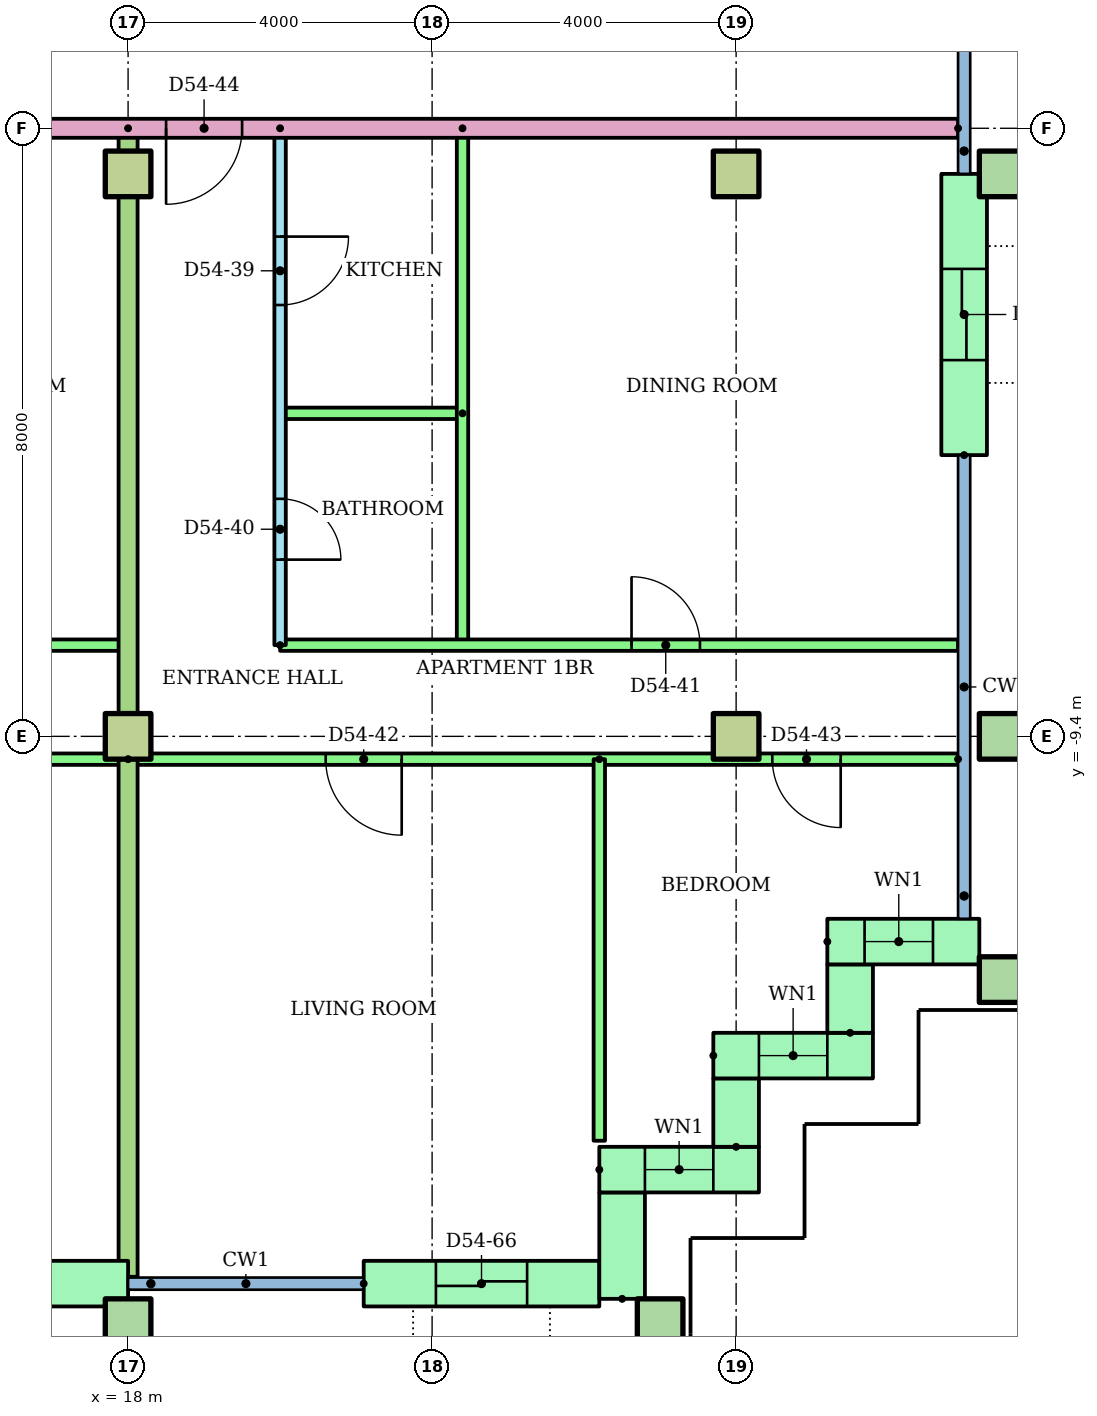
"""IFC4 building model, lengths in metres.
Left out: names, types, materials, properties, quantities, classifications, styles, units other than length and angle.
Written with IfcOpenShell. Run it as: python <this file> out.ifc"""

import sys

from ifc_helpers import new_model, si_unit, direction, frame, frame_2d, origin, origin_2d, place, context, subcontext, project, spatial, rectangle, hollow_rectangle, extrude, element, fill, save


model = new_model("IFC4")
c1 = context("Model", 3, precision=1e-05, world=origin(), true_north=direction((0.0, 1.0)))
c2 = subcontext(c1, "Body", "Model", "MODEL_VIEW")
j1 = project(units=[si_unit("LENGTHUNIT", "METRE"), si_unit("PLANEANGLEUNIT", "RADIAN")], contexts=[c1])
p1 = place(None, origin())
s1 = spatial("IfcSite", under=j1, at=p1, CompositionType="ELEMENT")
p2 = place(p1, origin())
s2 = spatial("IfcBuilding", under=s1, at=p2, CompositionType="ELEMENT")
p3 = place(p2, frame((0.0, 0.0, 210.8)))
s3 = spatial("IfcBuildingStorey", under=s2, at=p3, CompositionType="ELEMENT", Elevation=210.8)
for number, where in (
    (1, (18.0, -17.1, 0.0)),
    (2, (25.0, -17.1, 0.0)),
    (3, (29.5, -12.6, 0.0)),
):
    element("IfcColumn", number, at=place(p3, frame(where)), inside=s3, PredefinedType="COLUMN", context=c2, shape_type="SweptSolid", body=[
        extrude(hollow_rectangle(XDim=0.6, YDim=0.6, WallThickness=0.03, at=origin_2d()), origin(), (0.0, 0.0, 1.0), 3.2),
    ])
for number, where in (
    (4, (18.0, -9.4, 0.0)),
    (5, (26.0, -9.4, 0.0)),
):
    element("IfcColumn", number, at=place(p3, frame(where)), inside=s3, PredefinedType="COLUMN", context=c2, shape_type="SweptSolid", body=[
        extrude(rectangle(XDim=0.6, YDim=0.6, at=origin_2d()), origin(), (0.0, 0.0, 1.0), 3.2),
    ])
p4 = place(p3, frame((29.5, -9.4, 0.0)))
e6 = element("IfcColumn", 6, at=p4, inside=s3, PredefinedType="COLUMN", context=c2, shape_type="SweptSolid", body=[
    extrude(hollow_rectangle(XDim=0.6, YDim=0.6, WallThickness=0.03, at=origin_2d()), origin(), (0.0, 0.0, 1.0), 3.2),
])
for number, where in (
    (7, (18.0, -2.0, 0.0)),
    (8, (26.0, -2.0, 0.0)),
):
    element("IfcColumn", number, at=place(p3, frame(where)), inside=s3, PredefinedType="COLUMN", context=c2, shape_type="SweptSolid", body=[
        extrude(rectangle(XDim=0.6, YDim=0.6, at=origin_2d()), origin(), (0.0, 0.0, 1.0), 3.2),
    ])
p5 = place(p3, frame((29.5, -2.0, 0.0)))
e9 = element("IfcColumn", 9, at=p5, inside=s3, PredefinedType="COLUMN", context=c2, shape_type="SweptSolid", body=[
    extrude(hollow_rectangle(XDim=0.6, YDim=0.6, WallThickness=0.03, at=origin_2d()), origin(), (0.0, 0.0, 1.0), 3.2),
])
p6 = place(p3, frame((14.0, -16.6, 0.0)))
e10 = element("IfcWall", 10, at=p6, inside=s3, PredefinedType="STANDARD", context=c2, shape_type="SweptSolid", body=[
    extrude(rectangle(XDim=4.0, YDim=0.6, at=frame_2d((2.0, 0.0))), origin(), (0.0, 0.0, 1.0), 2.92),
])
p7 = place(p6, frame((1.4, 0.0, 0.0)))
e11 = element("IfcOpeningElement", 11, at=p7, cuts=e10, PredefinedType="OPENING", context=c2, shape_type="SweptSolid", body=[
    extrude(rectangle(XDim=1.2, YDim=2.1, at=frame_2d((0.6, 1.05))), frame((0.0, 0.31, 0.0), z_axis=(0.0, -1.0, 0.0), x_axis=(1.0, 0.0, 0.0)), (0.0, 0.0, 1.0), 0.62),
])
p8 = place(p3, frame((21.1, -16.6, 0.0)))
e12 = element("IfcWall", 12, at=p8, inside=s3, PredefinedType="STANDARD", context=c2, shape_type="SweptSolid", body=[
    extrude(rectangle(XDim=3.1, YDim=0.6, at=frame_2d((1.55, 0.0))), origin(), (0.0, 0.0, 1.0), 2.92),
])
p9 = place(p8, frame((0.95, 0.0, 0.0)))
e13 = element("IfcOpeningElement", 13, at=p9, cuts=e12, PredefinedType="OPENING", context=c2, shape_type="SweptSolid", body=[
    extrude(rectangle(XDim=1.2, YDim=2.1, at=frame_2d((0.6, 1.05))), frame((0.0, 0.31, 0.0), z_axis=(0.0, -1.0, 0.0), x_axis=(1.0, 0.0, 0.0)), (0.0, 0.0, 1.0), 0.62),
])
p10 = place(p3, frame((24.5, -16.8, 0.0), z_axis=(0.0, 0.0, 1.0), x_axis=(0.0, 1.0, 0.0)))
e14 = element("IfcWall", 14, at=p10, inside=s3, PredefinedType="STANDARD", context=c2, shape_type="SweptSolid", body=[
    extrude(rectangle(XDim=1.4, YDim=0.6, at=frame_2d((0.7, 0.0))), origin(), (0.0, 0.0, 1.0), 2.92),
])
p11 = place(p3, frame((24.2, -15.1, 0.0)))
e15 = element("IfcWall", 15, at=p11, inside=s3, PredefinedType="STANDARD", context=c2, shape_type="SweptSolid", body=[
    extrude(rectangle(XDim=2.1, YDim=0.6, at=frame_2d((1.05, 0.0))), origin(), (0.0, 0.0, 1.0), 2.92),
])
p12 = place(p11, frame((0.6, 0.0, 0.9)))
e16 = element("IfcOpeningElement", 16, at=p12, cuts=e15, PredefinedType="OPENING", context=c2, shape_type="SweptSolid", body=[
    extrude(rectangle(XDim=0.9, YDim=1.5, at=frame_2d((0.45, 0.75))), frame((0.0, 0.31, 0.0), z_axis=(0.0, -1.0, 0.0), x_axis=(1.0, 0.0, 0.0)), (0.0, 0.0, 1.0), 0.62),
])
p13 = place(p3, frame((26.0, -14.8, 0.0), z_axis=(0.0, 0.0, 1.0), x_axis=(0.0, 1.0, 0.0)))
e17 = element("IfcWall", 17, at=p13, inside=s3, PredefinedType="STANDARD", context=c2, shape_type="SweptSolid", body=[
    extrude(rectangle(XDim=0.9, YDim=0.6, at=frame_2d((0.45, 0.0))), origin(), (0.0, 0.0, 1.0), 2.92),
])
p14 = place(p3, frame((25.7, -13.6, 0.0)))
e18 = element("IfcWall", 18, at=p14, inside=s3, PredefinedType="STANDARD", context=c2, shape_type="SweptSolid", body=[
    extrude(rectangle(XDim=2.1, YDim=0.6, at=frame_2d((1.05, 0.0))), origin(), (0.0, 0.0, 1.0), 2.92),
])
p15 = place(p14, frame((0.6, 0.0, 0.9)))
e19 = element("IfcOpeningElement", 19, at=p15, cuts=e18, PredefinedType="OPENING", context=c2, shape_type="SweptSolid", body=[
    extrude(rectangle(XDim=0.9, YDim=1.5, at=frame_2d((0.45, 0.75))), frame((0.0, 0.31, 0.0), z_axis=(0.0, -1.0, 0.0), x_axis=(1.0, 0.0, 0.0)), (0.0, 0.0, 1.0), 0.62),
])
p16 = place(p3, frame((27.5, -13.3, 0.0), z_axis=(0.0, 0.0, 1.0), x_axis=(0.0, 1.0, 0.0)))
e20 = element("IfcWall", 20, at=p16, inside=s3, PredefinedType="STANDARD", context=c2, shape_type="SweptSolid", body=[
    extrude(rectangle(XDim=0.9, YDim=0.6, at=frame_2d((0.45, 0.0))), origin(), (0.0, 0.0, 1.0), 2.92),
])
p17 = place(p3, frame((27.2, -12.1, 0.0)))
e21 = element("IfcWall", 21, at=p17, inside=s3, PredefinedType="STANDARD", context=c2, shape_type="SweptSolid", body=[
    extrude(rectangle(XDim=2.0, YDim=0.6, at=frame_2d((1.0, 0.0))), origin(), (0.0, 0.0, 1.0), 2.92),
])
p18 = place(p17, frame((0.49, 0.0, 0.9)))
e22 = element("IfcOpeningElement", 22, at=p18, cuts=e21, PredefinedType="OPENING", context=c2, shape_type="SweptSolid", body=[
    extrude(rectangle(XDim=0.9, YDim=1.5, at=frame_2d((0.45, 0.75))), frame((0.0, 0.31, 0.0), z_axis=(0.0, -1.0, 0.0), x_axis=(1.0, 0.0, 0.0)), (0.0, 0.0, 1.0), 0.62),
])
p19 = place(p3, frame((29.0, -5.7, 0.0), z_axis=(0.0, 0.0, 1.0), x_axis=(0.0, 1.0, 0.0)))
e23 = element("IfcWall", 23, at=p19, inside=s3, PredefinedType="STANDARD", context=c2, shape_type="SweptSolid", body=[
    extrude(rectangle(XDim=3.7, YDim=0.6, at=frame_2d((1.85, 0.0))), origin(), (0.0, 0.0, 1.0), 2.92),
])
p20 = place(p19, frame((1.25, 0.0, 0.0)))
e24 = element("IfcOpeningElement", 24, at=p20, cuts=e23, PredefinedType="OPENING", context=c2, shape_type="SweptSolid", body=[
    extrude(rectangle(XDim=1.2, YDim=2.1, at=frame_2d((0.6, 1.05))), frame((0.0, 0.31, 0.0), z_axis=(0.0, -1.0, 0.0), x_axis=(1.0, 0.0, 0.0)), (0.0, 0.0, 1.0), 0.62),
])
p21 = place(p3, frame((12.0, -8.2, 0.0)))
e25 = element("IfcWall", 25, at=p21, inside=s3, PredefinedType="PARTITIONING", context=c2, shape_type="SweptSolid", body=[
    extrude(rectangle(XDim=6.0, YDim=0.15, at=frame_2d((3.0, 0.0))), origin(), (0.0, 0.0, 1.0), 2.4),
])
p22 = place(p21, frame((3.75, 0.0, 0.0)))
e26 = element("IfcOpeningElement", 26, at=p22, cuts=e25, PredefinedType="OPENING", context=c2, shape_type="SweptSolid", body=[
    extrude(rectangle(XDim=0.9, YDim=2.1, at=frame_2d((0.45, 1.05))), frame((0.0, 0.085, 0.0), z_axis=(0.0, -1.0, 0.0), x_axis=(1.0, 0.0, 0.0)), (0.0, 0.0, 1.0), 0.17),
])
p23 = place(p3, frame((18.0, -9.7, 0.0), z_axis=(0.0, 0.0, 1.0), x_axis=(-1.0, 0.0, 0.0)))
e27 = element("IfcWall", 27, at=p23, inside=s3, PredefinedType="PARTITIONING", context=c2, shape_type="SweptSolid", body=[
    extrude(rectangle(XDim=8.0, YDim=0.15, at=frame_2d((4.0, 0.0))), origin(), (0.0, 0.0, 1.0), 2.4),
])
p24 = place(p23, frame((5.55, 0.0, 0.0)))
e28 = element("IfcOpeningElement", 28, at=p24, cuts=e27, PredefinedType="OPENING", context=c2, shape_type="SweptSolid", body=[
    extrude(rectangle(XDim=0.9, YDim=2.1, at=frame_2d((0.45, 1.05))), frame((0.0, 0.085, 0.0), z_axis=(0.0, -1.0, 0.0), x_axis=(1.0, 0.0, 0.0)), (0.0, 0.0, 1.0), 0.17),
])
p25 = place(p23, frame((1.5, 0.0, 0.0)))
e29 = element("IfcOpeningElement", 29, at=p25, cuts=e27, PredefinedType="OPENING", context=c2, shape_type="SweptSolid", body=[
    extrude(rectangle(XDim=1.0, YDim=2.1, at=frame_2d((0.5, 1.05))), frame((0.0, 0.085, 0.0), z_axis=(0.0, -1.0, 0.0), x_axis=(1.0, 0.0, 0.0)), (0.0, 0.0, 1.0), 0.17),
])
p26 = place(p3, frame((20.0, -1.4, 0.0), z_axis=(0.0, 0.0, 1.0), x_axis=(0.0, -1.0, 0.0)))
e30 = element("IfcWall", 30, at=p26, inside=s3, PredefinedType="PARTITIONING", context=c2, shape_type="SweptSolid", body=[
    extrude(rectangle(XDim=6.8, YDim=0.15, at=frame_2d((3.4, 0.0))), origin(), (0.0, 0.0, 1.0), 2.4),
])
p27 = place(p26, frame((1.425, 0.0, 0.0)))
e31 = element("IfcOpeningElement", 31, at=p27, cuts=e30, PredefinedType="OPENING", context=c2, shape_type="SweptSolid", body=[
    extrude(rectangle(XDim=0.9, YDim=2.1, at=frame_2d((0.45, 1.05))), frame((0.0, 0.085, 0.0), z_axis=(0.0, -1.0, 0.0), x_axis=(1.0, 0.0, 0.0)), (0.0, 0.0, 1.0), 0.17),
])
p28 = place(p26, frame((4.875, 0.0, 0.0)))
e32 = element("IfcOpeningElement", 32, at=p28, cuts=e30, PredefinedType="OPENING", context=c2, shape_type="SweptSolid", body=[
    extrude(rectangle(XDim=0.8, YDim=2.1, at=frame_2d((0.4, 1.05))), frame((0.0, 0.085, 0.0), z_axis=(0.0, -1.0, 0.0), x_axis=(1.0, 0.0, 0.0)), (0.0, 0.0, 1.0), 0.17),
])
p29 = place(p3, frame((22.4, -5.15, 0.0), z_axis=(0.0, 0.0, 1.0), x_axis=(-1.0, 0.0, 0.0)))
e33 = element("IfcWall", 33, at=p29, inside=s3, PredefinedType="PARTITIONING", context=c2, shape_type="SweptSolid", body=[
    extrude(rectangle(XDim=2.4, YDim=0.15, at=frame_2d((1.2, 0.0))), origin(), (0.0, 0.0, 1.0), 2.4),
])
p30 = place(p3, frame((22.4, -1.4, 0.0), z_axis=(0.0, 0.0, 1.0), x_axis=(0.0, -1.0, 0.0)))
e34 = element("IfcWall", 34, at=p30, inside=s3, PredefinedType="PARTITIONING", context=c2, shape_type="SweptSolid", body=[
    extrude(rectangle(XDim=6.8, YDim=0.15, at=frame_2d((3.4, 0.0))), origin(), (0.0, 0.0, 1.0), 2.4),
])
p31 = place(p3, frame((20.0, -8.2, 0.0)))
e35 = element("IfcWall", 35, at=p31, inside=s3, PredefinedType="PARTITIONING", context=c2, shape_type="SweptSolid", body=[
    extrude(rectangle(XDim=8.92, YDim=0.15, at=frame_2d((4.46, 0.0))), origin(), (0.0, 0.0, 1.0), 2.4),
])
p32 = place(p31, frame((4.624, 0.0, 0.0)))
e36 = element("IfcOpeningElement", 36, at=p32, cuts=e35, PredefinedType="OPENING", context=c2, shape_type="SweptSolid", body=[
    extrude(rectangle(XDim=0.9, YDim=2.1, at=frame_2d((0.45, 1.05))), frame((0.0, 0.085, 0.0), z_axis=(0.0, -1.0, 0.0), x_axis=(1.0, 0.0, 0.0)), (0.0, 0.0, 1.0), 0.17),
])
p33 = place(p3, frame((28.92, -9.7, 0.0), z_axis=(0.0, 0.0, 1.0), x_axis=(-1.0, 0.0, 0.0)))
e37 = element("IfcWall", 37, at=p33, inside=s3, PredefinedType="PARTITIONING", context=c2, shape_type="SweptSolid", body=[
    extrude(rectangle(XDim=10.92, YDim=0.15, at=frame_2d((5.46, 0.0))), origin(), (0.0, 0.0, 1.0), 2.4),
])
p34 = place(p33, frame((7.32, 0.0, 0.0)))
e38 = element("IfcOpeningElement", 38, at=p34, cuts=e37, PredefinedType="OPENING", context=c2, shape_type="SweptSolid", body=[
    extrude(rectangle(XDim=1.0, YDim=2.1, at=frame_2d((0.5, 1.05))), frame((0.0, 0.085, 0.0), z_axis=(0.0, -1.0, 0.0), x_axis=(1.0, 0.0, 0.0)), (0.0, 0.0, 1.0), 0.17),
])
p35 = place(p33, frame((1.544, 0.0, 0.0)))
e39 = element("IfcOpeningElement", 39, at=p35, cuts=e37, PredefinedType="OPENING", context=c2, shape_type="SweptSolid", body=[
    extrude(rectangle(XDim=0.9, YDim=2.1, at=frame_2d((0.45, 1.05))), frame((0.0, 0.085, 0.0), z_axis=(0.0, -1.0, 0.0), x_axis=(1.0, 0.0, 0.0)), (0.0, 0.0, 1.0), 0.17),
])
p36 = place(p3, frame((24.2, -9.7, 0.0), z_axis=(0.0, 0.0, 1.0), x_axis=(0.0, -1.0, 0.0)))
e40 = element("IfcWall", 40, at=p36, inside=s3, PredefinedType="PARTITIONING", context=c2, shape_type="SweptSolid", body=[
    extrude(rectangle(XDim=5.02, YDim=0.15, at=frame_2d((2.51, 0.0))), origin(), (0.0, 0.0, 1.0), 2.4),
])
p37 = place(p3, frame((18.0, -1.4, 0.0), z_axis=(0.0, 0.0, 1.0), x_axis=(0.0, -1.0, 0.0)))
e41 = element("IfcWall", 41, at=p37, inside=s3, PredefinedType="PARTITIONING", context=c2, shape_type="SweptSolid", body=[
    extrude(rectangle(XDim=15.11, YDim=0.25, at=frame_2d((7.555, 0.0))), origin(), (0.0, 0.0, 1.0), 2.4),
])
p38 = place(p3, frame((28.92, -1.4, 0.0), z_axis=(0.0, 0.0, 1.0), x_axis=(-1.0, 0.0, 0.0)))
e42 = element("IfcWall", 42, at=p38, inside=s3, PredefinedType="PARTITIONING", context=c2, shape_type="SweptSolid", body=[
    extrude(rectangle(XDim=14.92, YDim=0.25, at=frame_2d((7.46, 0.0))), origin(), (0.0, 0.0, 1.0), 2.4),
])
p39 = place(p38, frame((9.42, 0.0, 0.0)))
e43 = element("IfcOpeningElement", 43, at=p39, cuts=e42, PredefinedType="OPENING", context=c2, shape_type="SweptSolid", body=[
    extrude(rectangle(XDim=1.0, YDim=2.1, at=frame_2d((0.5, 1.05))), frame((0.0, 0.135, 0.0), z_axis=(0.0, -1.0, 0.0), x_axis=(1.0, 0.0, 0.0)), (0.0, 0.0, 1.0), 0.27),
])
p40 = place(p12, origin())
e44 = element("IfcWindow", 44, at=p40, inside=s3, PartitioningType="SINGLE_PANEL", PredefinedType="WINDOW", context=c2, shape_type="SweptSolid", body=[
    extrude(rectangle(XDim=0.9, YDim=1.5, at=frame_2d((0.45, 0.75))), frame((0.0, 0.03, 0.0), z_axis=(0.0, -1.0, 0.0), x_axis=(1.0, 0.0, 0.0)), (0.0, 0.0, 1.0), 0.06),
])
fill(e16, e44)
p41 = place(p15, origin())
e45 = element("IfcWindow", 45, at=p41, inside=s3, PartitioningType="SINGLE_PANEL", PredefinedType="WINDOW", context=c2, shape_type="SweptSolid", body=[
    extrude(rectangle(XDim=0.9, YDim=1.5, at=frame_2d((0.45, 0.75))), frame((0.0, 0.03, 0.0), z_axis=(0.0, -1.0, 0.0), x_axis=(1.0, 0.0, 0.0)), (0.0, 0.0, 1.0), 0.06),
])
fill(e19, e45)
p42 = place(p18, origin())
e46 = element("IfcWindow", 46, at=p42, inside=s3, PartitioningType="SINGLE_PANEL", PredefinedType="WINDOW", context=c2, shape_type="SweptSolid", body=[
    extrude(rectangle(XDim=0.9, YDim=1.5, at=frame_2d((0.45, 0.75))), frame((0.0, 0.03, 0.0), z_axis=(0.0, -1.0, 0.0), x_axis=(1.0, 0.0, 0.0)), (0.0, 0.0, 1.0), 0.06),
])
fill(e22, e46)
p43 = place(p27, origin())
e47 = element("IfcDoor", 47, at=p43, inside=s3, OperationType="SINGLE_SWING_LEFT", PredefinedType="DOOR", context=c2, shape_type="SweptSolid", body=[
    extrude(rectangle(XDim=0.9, YDim=2.1, at=frame_2d((0.45, 1.05))), frame((0.0, 0.025, 0.0), z_axis=(0.0, -1.0, 0.0), x_axis=(1.0, 0.0, 0.0)), (0.0, 0.0, 1.0), 0.05),
])
fill(e31, e47)
p44 = place(p28, origin())
e48 = element("IfcDoor", 48, at=p44, inside=s3, OperationType="SINGLE_SWING_RIGHT", PredefinedType="DOOR", context=c2, shape_type="SweptSolid", body=[
    extrude(rectangle(XDim=0.8, YDim=2.1, at=frame_2d((0.4, 1.05))), frame((0.0, 0.025, 0.0), z_axis=(0.0, -1.0, 0.0), x_axis=(1.0, 0.0, 0.0)), (0.0, 0.0, 1.0), 0.05),
])
fill(e32, e48)
p45 = place(p32, origin())
e49 = element("IfcDoor", 49, at=p45, inside=s3, OperationType="SINGLE_SWING_LEFT", PredefinedType="DOOR", context=c2, shape_type="SweptSolid", body=[
    extrude(rectangle(XDim=0.9, YDim=2.1, at=frame_2d((0.45, 1.05))), frame((0.0, 0.025, 0.0), z_axis=(0.0, -1.0, 0.0), x_axis=(1.0, 0.0, 0.0)), (0.0, 0.0, 1.0), 0.05),
])
fill(e36, e49)
p46 = place(p34, origin())
e50 = element("IfcDoor", 50, at=p46, inside=s3, OperationType="SINGLE_SWING_LEFT", PredefinedType="DOOR", context=c2, shape_type="SweptSolid", body=[
    extrude(rectangle(XDim=1.0, YDim=2.1, at=frame_2d((0.5, 1.05))), frame((0.0, 0.025, 0.0), z_axis=(0.0, -1.0, 0.0), x_axis=(1.0, 0.0, 0.0)), (0.0, 0.0, 1.0), 0.05),
])
fill(e38, e50)
p47 = place(p35, origin())
e51 = element("IfcDoor", 51, at=p47, inside=s3, OperationType="SINGLE_SWING_LEFT", PredefinedType="DOOR", context=c2, shape_type="SweptSolid", body=[
    extrude(rectangle(XDim=0.9, YDim=2.1, at=frame_2d((0.45, 1.05))), frame((0.0, 0.025, 0.0), z_axis=(0.0, -1.0, 0.0), x_axis=(1.0, 0.0, 0.0)), (0.0, 0.0, 1.0), 0.05),
])
fill(e39, e51)
p48 = place(p39, origin())
e52 = element("IfcDoor", 52, at=p48, inside=s3, OperationType="SINGLE_SWING_RIGHT", PredefinedType="DOOR", context=c2, shape_type="SweptSolid", body=[
    extrude(rectangle(XDim=1.0, YDim=2.1, at=frame_2d((0.5, 1.05))), frame((0.0, 0.025, 0.0), z_axis=(0.0, -1.0, 0.0), x_axis=(1.0, 0.0, 0.0)), (0.0, 0.0, 1.0), 0.05),
])
fill(e43, e52)
p49 = place(p9, origin())
e53 = element("IfcDoor", 53, at=p49, inside=s3, OperationType="SLIDING_TO_LEFT", PredefinedType="DOOR", context=c2, shape_type="SweptSolid", body=[
    extrude(rectangle(XDim=1.2, YDim=2.1, at=frame_2d((0.6, 1.05))), frame((0.0, 0.025, 0.0), z_axis=(0.0, -1.0, 0.0), x_axis=(1.0, 0.0, 0.0)), (0.0, 0.0, 1.0), 0.05),
])
fill(e13, e53)
p50 = place(p20, origin())
e54 = element("IfcDoor", 54, at=p50, inside=s3, OperationType="SLIDING_TO_LEFT", PredefinedType="DOOR", context=c2, shape_type="SweptSolid", body=[
    extrude(rectangle(XDim=1.2, YDim=2.1, at=frame_2d((0.6, 1.05))), frame((0.0, 0.025, 0.0), z_axis=(0.0, -1.0, 0.0), x_axis=(1.0, 0.0, 0.0)), (0.0, 0.0, 1.0), 0.05),
])
fill(e24, e54)
save(model, sys.argv[1])
